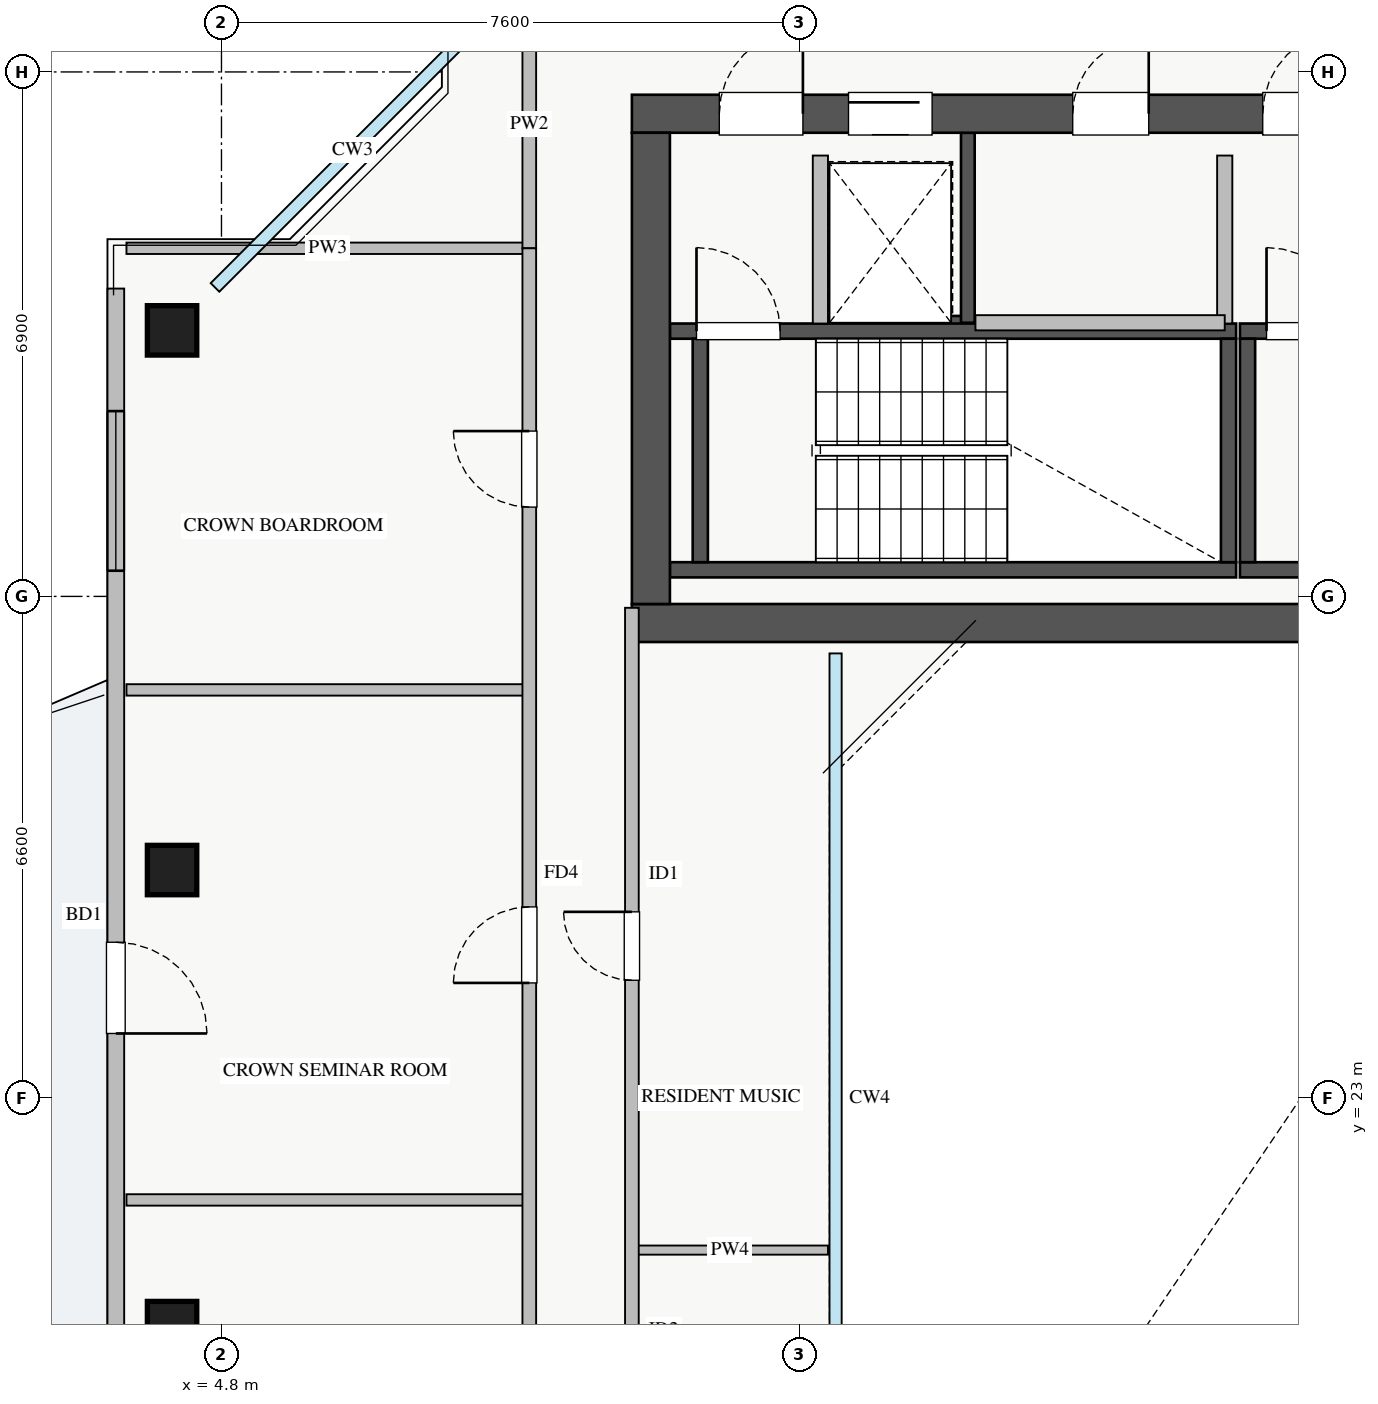
"""IFC4 building model, lengths in metres.
Left out: names, types, materials, properties, quantities, classifications, styles, units other than length and angle.
Written with IfcOpenShell. Run it as: python <this file> out.ifc"""

import sys

from ifc_helpers import new_model, si_unit, direction, frame, frame_2d, origin, origin_2d, place, context, subcontext, project, spatial, rectangle, extrude, source, transform, mapped, element, fill, save


model = new_model("IFC4")
c1 = context("Model", 3, precision=1e-05, world=origin(), true_north=direction((0.0, 1.0)))
c2 = subcontext(c1, "Body", "Model", "MODEL_VIEW")
j1 = project(units=[si_unit("LENGTHUNIT", "METRE"), si_unit("PLANEANGLEUNIT", "RADIAN")], contexts=[c1])
p1 = place(None, origin())
s1 = spatial("IfcSite", under=j1, at=p1, CompositionType="ELEMENT")
p2 = place(p1, origin())
s2 = spatial("IfcBuilding", under=s1, at=p2, CompositionType="ELEMENT")
p3 = place(p2, frame((0.0, 0.0, 243.75)))
s3 = spatial("IfcBuildingStorey", under=s2, at=p3, CompositionType="ELEMENT", Elevation=243.75)
p4 = place(p3, frame((12.68, 33.2, 0.0), z_axis=(0.0, 0.0, 1.0), x_axis=(1.0, 0.0, 0.0)))
e1 = element("IfcWall", 1, at=p4, inside=s3, PredefinedType="SHEAR", context=c2, shape_type="SweptSolid", body=[
    extrude(rectangle(XDim=1.94, YDim=0.18, at=frame_2d((0.97, 0.0))), origin(), (0.0, 0.0, 1.0), 3.07),
])
p5 = place(p3, frame((14.62, 33.2, 0.0), z_axis=(0.0, 0.0, 1.0), x_axis=(0.0, 1.0, 0.0)))
e2 = element("IfcWall", 2, at=p5, inside=s3, PredefinedType="SHEAR", context=c2, shape_type="SweptSolid", body=[
    extrude(rectangle(XDim=2.5, YDim=0.18, at=frame_2d((1.25, 0.0))), origin(), (0.0, 0.0, 1.0), 3.07),
])
p6 = place(p3, frame((10.7, 29.95, 0.0), z_axis=(0.0, 0.0, 1.0), x_axis=(1.0, 0.0, 0.0)))
e3 = element("IfcWall", 3, at=p6, inside=s3, PredefinedType="SHEAR", context=c2, shape_type="SweptSolid", body=[
    extrude(rectangle(XDim=7.45, YDim=0.2, at=frame_2d((3.725, 0.0))), origin(), (0.0, 0.0, 1.0), 3.25),
])
p7 = place(p3, frame((10.7, 33.09, 0.0), z_axis=(0.0, 0.0, 1.0), x_axis=(1.0, 0.0, 0.0)))
e4 = element("IfcWall", 4, at=p7, inside=s3, PredefinedType="SHEAR", context=c2, shape_type="SweptSolid", body=[
    extrude(rectangle(XDim=7.45, YDim=0.2, at=frame_2d((3.725, 0.0))), origin(), (0.0, 0.0, 1.0), 3.25),
])
p8 = place(p7, frame((0.35, 0.0, 0.0)))
e5 = element("IfcOpeningElement", 5, at=p8, cuts=e4, PredefinedType="OPENING", context=c2, shape_type="SweptSolid", body=[
    extrude(rectangle(XDim=1.1, YDim=2.05, at=frame_2d((0.55, 1.025))), frame((0.0, 0.11, 0.0), z_axis=(0.0, -1.0, 0.0), x_axis=(1.0, 0.0, 0.0)), (0.0, 0.0, 1.0), 0.22),
])
for number, where, z_axis, x_axis in (
    (6, (11.1, 30.05, 0.0), (0.0, 0.0, 1.0), (0.0, 1.0, 0.0)),
    (7, (18.05, 30.05, 0.0), (0.0, 0.0, 1.0), (0.0, 1.0, 0.0)),
):
    element("IfcWall", number, at=place(p3, frame(where, z_axis=z_axis, x_axis=x_axis)), inside=s3, PredefinedType="SHEAR", context=c2, shape_type="SweptSolid", body=[
        extrude(rectangle(XDim=2.94, YDim=0.2, at=frame_2d((1.47, 0.0))), origin(), (0.0, 0.0, 1.0), 3.25),
    ])
p9 = place(p3, frame((18.2, 29.95, 0.0), z_axis=(0.0, 0.0, 1.0), x_axis=(1.0, 0.0, 0.0)))
e8 = element("IfcWall", 8, at=p9, inside=s3, PredefinedType="SHEAR", context=c2, shape_type="SweptSolid", body=[
    extrude(rectangle(XDim=7.15, YDim=0.2, at=frame_2d((3.575, 0.0))), origin(), (0.0, 0.0, 1.0), 3.25),
])
p10 = place(p3, frame((18.2, 33.09, 0.0), z_axis=(0.0, 0.0, 1.0), x_axis=(1.0, 0.0, 0.0)))
e9 = element("IfcWall", 9, at=p10, inside=s3, PredefinedType="SHEAR", context=c2, shape_type="SweptSolid", body=[
    extrude(rectangle(XDim=7.15, YDim=0.2, at=frame_2d((3.575, 0.0))), origin(), (0.0, 0.0, 1.0), 3.25),
])
p11 = place(p10, frame((0.35, 0.0, 0.0)))
e10 = element("IfcOpeningElement", 10, at=p11, cuts=e9, PredefinedType="OPENING", context=c2, shape_type="SweptSolid", body=[
    extrude(rectangle(XDim=1.1, YDim=2.05, at=frame_2d((0.55, 1.025))), frame((0.0, 0.11, 0.0), z_axis=(0.0, -1.0, 0.0), x_axis=(1.0, 0.0, 0.0)), (0.0, 0.0, 1.0), 0.22),
])
p12 = place(p3, frame((18.3, 30.05, 0.0), z_axis=(0.0, 0.0, 1.0), x_axis=(0.0, 1.0, 0.0)))
e11 = element("IfcWall", 11, at=p12, inside=s3, PredefinedType="SHEAR", context=c2, shape_type="SweptSolid", body=[
    extrude(rectangle(XDim=2.94, YDim=0.2, at=frame_2d((1.47, 0.0))), origin(), (0.0, 0.0, 1.0), 3.25),
])
p13 = place(p3, frame((10.2, 29.25, 0.0), z_axis=(0.0, 0.0, 1.0), x_axis=(1.0, 0.0, 0.0)))
e12 = element("IfcWall", 12, at=p13, inside=s3, PredefinedType="SHEAR", context=c2, shape_type="SweptSolid", body=[
    extrude(rectangle(XDim=17.6, YDim=0.5, at=frame_2d((8.8, 0.0))), origin(), (0.0, 0.0, 1.0), 3.25),
])
p14 = place(p3, frame((10.2, 35.95, 0.0), z_axis=(0.0, 0.0, 1.0), x_axis=(1.0, 0.0, 0.0)))
e13 = element("IfcWall", 13, at=p14, inside=s3, PredefinedType="SHEAR", context=c2, shape_type="SweptSolid", body=[
    extrude(rectangle(XDim=17.6, YDim=0.5, at=frame_2d((8.8, 0.0))), origin(), (0.0, 0.0, 1.0), 3.25),
])
p15 = place(p14, frame((1.15, 0.0, 0.0)))
e14 = element("IfcOpeningElement", 14, at=p15, cuts=e13, PredefinedType="OPENING", context=c2, shape_type="SweptSolid", body=[
    extrude(rectangle(XDim=1.1, YDim=2.05, at=frame_2d((0.55, 1.025))), frame((0.0, 0.26, 0.0), z_axis=(0.0, -1.0, 0.0), x_axis=(1.0, 0.0, 0.0)), (0.0, 0.0, 1.0), 0.52),
])
p16 = place(p14, frame((8.3, 0.0, 0.0)))
e15 = element("IfcOpeningElement", 15, at=p16, cuts=e13, PredefinedType="OPENING", context=c2, shape_type="SweptSolid", body=[
    extrude(rectangle(XDim=1.1, YDim=2.05, at=frame_2d((0.55, 1.025))), frame((0.0, 0.26, 0.0), z_axis=(0.0, -1.0, 0.0), x_axis=(1.0, 0.0, 0.0)), (0.0, 0.0, 1.0), 0.52),
])
p17 = place(p14, frame((2.85, 0.0, 0.0)))
e16 = element("IfcOpeningElement", 16, at=p17, cuts=e13, PredefinedType="OPENING", context=c2, shape_type="SweptSolid", body=[
    extrude(rectangle(XDim=1.1, YDim=2.05, at=frame_2d((0.55, 1.025))), frame((0.0, 0.26, 0.0), z_axis=(0.0, -1.0, 0.0), x_axis=(1.0, 0.0, 0.0)), (0.0, 0.0, 1.0), 0.52),
])
p18 = place(p14, frame((5.8, 0.0, 0.0)))
e17 = element("IfcOpeningElement", 17, at=p18, cuts=e13, PredefinedType="OPENING", context=c2, shape_type="SweptSolid", body=[
    extrude(rectangle(XDim=1.0, YDim=2.05, at=frame_2d((0.5, 1.025))), frame((0.0, 0.26, 0.0), z_axis=(0.0, -1.0, 0.0), x_axis=(1.0, 0.0, 0.0)), (0.0, 0.0, 1.0), 0.52),
])
p19 = place(p14, frame((14.74, 0.0, 0.0)))
e18 = element("IfcOpeningElement", 18, at=p19, cuts=e13, PredefinedType="OPENING", context=c2, shape_type="SweptSolid", body=[
    extrude(rectangle(XDim=1.0, YDim=2.05, at=frame_2d((0.5, 1.025))), frame((0.0, 0.26, 0.0), z_axis=(0.0, -1.0, 0.0), x_axis=(1.0, 0.0, 0.0)), (0.0, 0.0, 1.0), 0.52),
])
p20 = place(p14, frame((10.005, 0.0, 0.0)))
e19 = element("IfcOpeningElement", 19, at=p20, cuts=e13, PredefinedType="OPENING", context=c2, shape_type="SweptSolid", body=[
    extrude(rectangle(XDim=1.0, YDim=2.05, at=frame_2d((0.5, 1.025))), frame((0.0, 0.26, 0.0), z_axis=(0.0, -1.0, 0.0), x_axis=(1.0, 0.0, 0.0)), (0.0, 0.0, 1.0), 0.52),
])
p21 = place(p14, frame((11.55, 0.0, 0.0)))
e20 = element("IfcOpeningElement", 20, at=p21, cuts=e13, PredefinedType="OPENING", context=c2, shape_type="SweptSolid", body=[
    extrude(rectangle(XDim=1.0, YDim=2.05, at=frame_2d((0.5, 1.025))), frame((0.0, 0.26, 0.0), z_axis=(0.0, -1.0, 0.0), x_axis=(1.0, 0.0, 0.0)), (0.0, 0.0, 1.0), 0.52),
])
p22 = place(p14, frame((13.215, 0.0, 0.0)))
e21 = element("IfcOpeningElement", 21, at=p22, cuts=e13, PredefinedType="OPENING", context=c2, shape_type="SweptSolid", body=[
    extrude(rectangle(XDim=1.0, YDim=2.05, at=frame_2d((0.5, 1.025))), frame((0.0, 0.26, 0.0), z_axis=(0.0, -1.0, 0.0), x_axis=(1.0, 0.0, 0.0)), (0.0, 0.0, 1.0), 0.52),
])
p23 = place(p3, frame((10.45, 29.5, 0.0), z_axis=(0.0, 0.0, 1.0), x_axis=(0.0, 1.0, 0.0)))
e22 = element("IfcWall", 22, at=p23, inside=s3, PredefinedType="SHEAR", context=c2, shape_type="SweptSolid", body=[
    extrude(rectangle(XDim=6.2, YDim=0.5, at=frame_2d((3.1, 0.0))), origin(), (0.0, 0.0, 1.0), 3.25),
])
m1 = source(origin(), c2, "Body", "SweptSolid", [
    extrude(rectangle(XDim=0.65, YDim=0.65, at=origin_2d()), origin(), (0.0, 0.0, 1.0), 3.25),
])
for number, where, z_axis, x_axis in (
    (23, (4.15, 33.1, 0.0), (0.0, 0.0, 1.0), (1.0, 0.0, 0.0)),
    (24, (4.15, 26.0, 0.0), (0.0, 0.0, 1.0), (1.0, 0.0, 0.0)),
    (25, (4.15, 20.0, 0.0), (0.0, 0.0, 1.0), (1.0, 0.0, 0.0)),
):
    element("IfcColumn", number, at=place(p3, frame(where, z_axis=z_axis, x_axis=x_axis)), inside=s3, PredefinedType="COLUMN", context=c2, shape_type="MappedRepresentation", body=[
        mapped(m1, transform((0.0, 0.0, 0.0), x_axis=(1.0, 0.0, 0.0), y_axis=(0.0, 1.0, 0.0), z_axis=(0.0, 0.0, 1.0), scale=1.0)),
    ])
p24 = place(p3, frame((3.41, 12.35, 0.0), z_axis=(0.0, 0.0, 1.0), x_axis=(0.0, 1.0, 0.0)))
e26 = element("IfcWall", 26, at=p24, inside=s3, PredefinedType="STANDARD", context=c2, shape_type="SweptSolid", body=[
    extrude(rectangle(XDim=21.3, YDim=0.22, at=frame_2d((10.65, 0.0))), origin(), (0.0, 0.0, 1.0), 2.61),
])
p25 = place(p24, frame((11.5, 0.0, 0.0)))
e27 = element("IfcOpeningElement", 27, at=p25, cuts=e26, PredefinedType="OPENING", context=c2, shape_type="SweptSolid", body=[
    extrude(rectangle(XDim=1.2, YDim=2.1, at=frame_2d((0.6, 1.05))), frame((0.0, 0.12, 0.0), z_axis=(0.0, -1.0, 0.0), x_axis=(1.0, 0.0, 0.0)), (0.0, 0.0, 1.0), 0.24),
])
p26 = place(p24, frame((1.463, 0.0, 0.9)))
e28 = element("IfcOpeningElement", 28, at=p26, cuts=e26, PredefinedType="OPENING", context=c2, shape_type="SweptSolid", body=[
    extrude(rectangle(XDim=2.4, YDim=1.48, at=frame_2d((1.2, 0.74))), frame((0.0, 0.12, 0.0), z_axis=(0.0, -1.0, 0.0), x_axis=(1.0, 0.0, 0.0)), (0.0, 0.0, 1.0), 0.24),
])
p27 = place(p24, frame((17.588, 0.0, 0.9)))
e29 = element("IfcOpeningElement", 29, at=p27, cuts=e26, PredefinedType="OPENING", context=c2, shape_type="SweptSolid", body=[
    extrude(rectangle(XDim=2.1, YDim=1.48, at=frame_2d((1.05, 0.74))), frame((0.0, 0.12, 0.0), z_axis=(0.0, -1.0, 0.0), x_axis=(1.0, 0.0, 0.0)), (0.0, 0.0, 1.0), 0.24),
])
for number, where, z_axis, x_axis in (
    (30, (12.68, 33.19, 0.0), (0.0, 0.0, 1.0), (0.0, 1.0, 0.0)),
    (31, (18.0, 33.19, 0.0), (0.0, 0.0, 1.0), (0.0, 1.0, 0.0)),
):
    element("IfcWall", number, at=place(p3, frame(where, z_axis=z_axis, x_axis=x_axis)), inside=s3, PredefinedType="PARTITIONING", context=c2, shape_type="SweptSolid", body=[
        extrude(rectangle(XDim=2.21, YDim=0.2, at=frame_2d((1.105, 0.0))), origin(), (0.0, 0.0, 1.0), 3.07),
    ])
p28 = place(p3, frame((14.72, 33.2, 0.0), z_axis=(0.0, 0.0, 1.0), x_axis=(1.0, 0.0, 0.0)))
e32 = element("IfcWall", 32, at=p28, inside=s3, PredefinedType="PARTITIONING", context=c2, shape_type="SweptSolid", body=[
    extrude(rectangle(XDim=3.28, YDim=0.2, at=frame_2d((1.64, 0.0))), origin(), (0.0, 0.0, 1.0), 3.07),
])
p29 = place(p3, frame((3.55, 34.18, 0.0), z_axis=(0.0, 0.0, 1.0), x_axis=(1.0, 0.0, 0.0)))
e33 = element("IfcWall", 33, at=p29, inside=s3, PredefinedType="PARTITIONING", context=c2, shape_type="SweptSolid", body=[
    extrude(rectangle(XDim=5.3, YDim=0.15, at=frame_2d((2.65, 0.0))), origin(), (0.0, 0.0, 1.0), 3.07),
])
p30 = place(p3, frame((8.85, 34.18, 0.0), z_axis=(0.0, 0.0, 1.0), x_axis=(0.0, 1.0, 0.0)))
e34 = element("IfcWall", 34, at=p30, inside=s3, PredefinedType="PARTITIONING", context=c2, shape_type="SweptSolid", body=[
    extrude(rectangle(XDim=3.26, YDim=0.18, at=frame_2d((1.63, 0.0))), origin(), (0.0, 0.0, 1.0), 2.569),
])
p31 = place(p3, frame((3.55, 21.66, 0.0), z_axis=(0.0, 0.0, 1.0), x_axis=(1.0, 0.0, 0.0)))
e35 = element("IfcWall", 35, at=p31, inside=s3, PredefinedType="PARTITIONING", context=c2, shape_type="SweptSolid", body=[
    extrude(rectangle(XDim=5.3, YDim=0.15, at=frame_2d((2.65, 0.0))), origin(), (0.0, 0.0, 1.0), 2.771),
])
p32 = place(p3, frame((3.55, 28.37, 0.0), z_axis=(0.0, 0.0, 1.0), x_axis=(1.0, 0.0, 0.0)))
e36 = element("IfcWall", 36, at=p32, inside=s3, PredefinedType="PARTITIONING", context=c2, shape_type="SweptSolid", body=[
    extrude(rectangle(XDim=5.3, YDim=0.15, at=frame_2d((2.65, 0.0))), origin(), (0.0, 0.0, 1.0), 3.07),
])
p33 = place(p3, frame((8.85, 11.82, 0.0), z_axis=(0.0, 0.0, 1.0), x_axis=(0.0, 1.0, 0.0)))
e37 = element("IfcWall", 37, at=p33, inside=s3, PredefinedType="PARTITIONING", context=c2, shape_type="SweptSolid", body=[
    extrude(rectangle(XDim=22.36, YDim=0.18, at=frame_2d((11.18, 0.0))), origin(), (0.0, 0.0, 1.0), 2.569),
])
p34 = place(p33, frame((4.42, 0.0, 0.0)))
e38 = element("IfcOpeningElement", 38, at=p34, cuts=e37, PredefinedType="OPENING", context=c2, shape_type="SweptSolid", body=[
    extrude(rectangle(XDim=1.0, YDim=2.05, at=frame_2d((0.5, 1.025))), frame((0.0, 0.1, 0.0), z_axis=(0.0, -1.0, 0.0), x_axis=(1.0, 0.0, 0.0)), (0.0, 0.0, 1.0), 0.2),
])
p35 = place(p33, frame((12.695, 0.0, 0.0)))
e39 = element("IfcOpeningElement", 39, at=p35, cuts=e37, PredefinedType="OPENING", context=c2, shape_type="SweptSolid", body=[
    extrude(rectangle(XDim=1.0, YDim=2.05, at=frame_2d((0.5, 1.025))), frame((0.0, 0.1, 0.0), z_axis=(0.0, -1.0, 0.0), x_axis=(1.0, 0.0, 0.0)), (0.0, 0.0, 1.0), 0.2),
])
p36 = place(p33, frame((18.955, 0.0, 0.0)))
e40 = element("IfcOpeningElement", 40, at=p36, cuts=e37, PredefinedType="OPENING", context=c2, shape_type="SweptSolid", body=[
    extrude(rectangle(XDim=1.0, YDim=2.05, at=frame_2d((0.5, 1.025))), frame((0.0, 0.1, 0.0), z_axis=(0.0, -1.0, 0.0), x_axis=(1.0, 0.0, 0.0)), (0.0, 0.0, 1.0), 0.2),
])
p37 = place(p3, frame((10.2, 21.0, 0.0), z_axis=(0.0, 0.0, 1.0), x_axis=(1.0, 0.0, 0.0)))
e41 = element("IfcWall", 41, at=p37, inside=s3, PredefinedType="PLUMBINGWALL", context=c2, shape_type="SweptSolid", body=[
    extrude(rectangle(XDim=2.58, YDim=0.12, at=frame_2d((1.29, 0.0))), origin(), (0.0, 0.0, 1.0), 3.07),
])
p38 = place(p3, frame((10.2, 16.55, 0.0), z_axis=(0.0, 0.0, 1.0), x_axis=(0.0, 1.0, 0.0)))
e42 = element("IfcWall", 42, at=p38, inside=s3, PredefinedType="PARTITIONING", context=c2, shape_type="SweptSolid", body=[
    extrude(rectangle(XDim=12.9, YDim=0.18, at=frame_2d((6.45, 0.0))), origin(), (0.0, 0.0, 1.0), 3.07),
])
p39 = place(p38, frame((2.025, 0.0, 0.0)))
e43 = element("IfcOpeningElement", 43, at=p39, cuts=e42, PredefinedType="OPENING", context=c2, shape_type="SweptSolid", body=[
    extrude(rectangle(XDim=0.85, YDim=2.05, at=frame_2d((0.425, 1.025))), frame((0.0, 0.1, 0.0), z_axis=(0.0, -1.0, 0.0), x_axis=(1.0, 0.0, 0.0)), (0.0, 0.0, 1.0), 0.2),
])
p40 = place(p38, frame((8.0, 0.0, 0.0)))
e44 = element("IfcOpeningElement", 44, at=p40, cuts=e42, PredefinedType="OPENING", context=c2, shape_type="SweptSolid", body=[
    extrude(rectangle(XDim=0.9, YDim=2.05, at=frame_2d((0.45, 1.025))), frame((0.0, 0.1, 0.0), z_axis=(0.0, -1.0, 0.0), x_axis=(1.0, 0.0, 0.0)), (0.0, 0.0, 1.0), 0.2),
])
m2 = source(origin(), c2, "Body", "SweptSolid", [
    extrude(rectangle(XDim=1.2, YDim=2.1, at=frame_2d((0.6, 1.05))), frame((0.0, 0.025, 0.0), z_axis=(0.0, -1.0, 0.0), x_axis=(1.0, 0.0, 0.0)), (0.0, 0.0, 1.0), 0.05),
])
p41 = place(p25, frame((1.2, 0.0, 0.0), z_axis=(0.0, 0.0, 1.0), x_axis=(-1.0, 0.0, 0.0)))
e45 = element("IfcDoor", 45, at=p41, inside=s3, OperationType="SINGLE_SWING_LEFT", PredefinedType="DOOR", context=c2, shape_type="MappedRepresentation", body=[
    mapped(m2, transform((0.0, 0.0, 0.0), x_axis=(1.0, 0.0, 0.0), y_axis=(0.0, 1.0, 0.0), z_axis=(0.0, 0.0, 1.0), scale=1.0)),
])
fill(e27, e45)
m3 = source(origin(), c2, "Body", "SweptSolid", [
    extrude(rectangle(XDim=2.1, YDim=1.48, at=frame_2d((1.05, 0.74))), frame((0.0, 0.03, 0.0), z_axis=(0.0, -1.0, 0.0), x_axis=(1.0, 0.0, 0.0)), (0.0, 0.0, 1.0), 0.06),
])
p42 = place(p27, origin())
e46 = element("IfcWindow", 46, at=p42, inside=s3, PartitioningType="TRIPLE_PANEL_VERTICAL", PredefinedType="WINDOW", context=c2, shape_type="MappedRepresentation", body=[
    mapped(m3, transform((0.0, 0.0, 0.0), x_axis=(1.0, 0.0, 0.0), y_axis=(0.0, 1.0, 0.0), z_axis=(0.0, 0.0, 1.0), scale=1.0)),
])
fill(e29, e46)
m4 = source(origin(), c2, "Body", "SweptSolid", [
    extrude(rectangle(XDim=1.1, YDim=2.05, at=frame_2d((0.55, 1.025))), frame((0.0, 0.025, 0.0), z_axis=(0.0, -1.0, 0.0), x_axis=(1.0, 0.0, 0.0)), (0.0, 0.0, 1.0), 0.05),
])
p43 = place(p15, origin())
e47 = element("IfcDoor", 47, at=p43, inside=s3, OperationType="SINGLE_SWING_RIGHT", PredefinedType="DOOR", context=c2, shape_type="MappedRepresentation", body=[
    mapped(m4, transform((0.0, 0.0, 0.0), x_axis=(1.0, 0.0, 0.0), y_axis=(0.0, 1.0, 0.0), z_axis=(0.0, 0.0, 1.0), scale=1.0)),
])
fill(e14, e47)
p44 = place(p8, origin())
e48 = element("IfcDoor", 48, at=p44, inside=s3, OperationType="SINGLE_SWING_LEFT", PredefinedType="DOOR", context=c2, shape_type="MappedRepresentation", body=[
    mapped(m4, transform((0.0, 0.0, 0.0), x_axis=(1.0, 0.0, 0.0), y_axis=(0.0, 1.0, 0.0), z_axis=(0.0, 0.0, 1.0), scale=1.0)),
])
fill(e5, e48)
p45 = place(p16, origin())
e49 = element("IfcDoor", 49, at=p45, inside=s3, OperationType="SINGLE_SWING_RIGHT", PredefinedType="DOOR", context=c2, shape_type="MappedRepresentation", body=[
    mapped(m4, transform((0.0, 0.0, 0.0), x_axis=(1.0, 0.0, 0.0), y_axis=(0.0, 1.0, 0.0), z_axis=(0.0, 0.0, 1.0), scale=1.0)),
])
fill(e15, e49)
p46 = place(p11, origin())
e50 = element("IfcDoor", 50, at=p46, inside=s3, OperationType="SINGLE_SWING_LEFT", PredefinedType="DOOR", context=c2, shape_type="MappedRepresentation", body=[
    mapped(m4, transform((0.0, 0.0, 0.0), x_axis=(1.0, 0.0, 0.0), y_axis=(0.0, 1.0, 0.0), z_axis=(0.0, 0.0, 1.0), scale=1.0)),
])
fill(e10, e50)
p47 = place(p17, origin())
e51 = element("IfcDoor", 51, at=p47, inside=s3, OperationType="SLIDING_TO_LEFT", PredefinedType="DOOR", context=c2, shape_type="MappedRepresentation", body=[
    mapped(m4, transform((0.0, 0.0, 0.0), x_axis=(1.0, 0.0, 0.0), y_axis=(0.0, 1.0, 0.0), z_axis=(0.0, 0.0, 1.0), scale=1.0)),
])
fill(e16, e51)
m5 = source(origin(), c2, "Body", "SweptSolid", [
    extrude(rectangle(XDim=1.0, YDim=2.05, at=frame_2d((0.5, 1.025))), frame((0.0, 0.025, 0.0), z_axis=(0.0, -1.0, 0.0), x_axis=(1.0, 0.0, 0.0)), (0.0, 0.0, 1.0), 0.05),
])
p48 = place(p18, origin())
e52 = element("IfcDoor", 52, at=p48, inside=s3, OperationType="SINGLE_SWING_RIGHT", PredefinedType="DOOR", context=c2, shape_type="MappedRepresentation", body=[
    mapped(m5, transform((0.0, 0.0, 0.0), x_axis=(1.0, 0.0, 0.0), y_axis=(0.0, 1.0, 0.0), z_axis=(0.0, 0.0, 1.0), scale=1.0)),
])
fill(e17, e52)
p49 = place(p35, origin())
e53 = element("IfcDoor", 53, at=p49, inside=s3, OperationType="SINGLE_SWING_LEFT", PredefinedType="DOOR", context=c2, shape_type="MappedRepresentation", body=[
    mapped(m5, transform((0.0, 0.0, 0.0), x_axis=(1.0, 0.0, 0.0), y_axis=(0.0, 1.0, 0.0), z_axis=(0.0, 0.0, 1.0), scale=1.0)),
])
fill(e39, e53)
p50 = place(p36, origin())
e54 = element("IfcDoor", 54, at=p50, inside=s3, OperationType="SINGLE_SWING_RIGHT", PredefinedType="DOOR", context=c2, shape_type="MappedRepresentation", body=[
    mapped(m5, transform((0.0, 0.0, 0.0), x_axis=(1.0, 0.0, 0.0), y_axis=(0.0, 1.0, 0.0), z_axis=(0.0, 0.0, 1.0), scale=1.0)),
])
fill(e40, e54)
m6 = source(origin(), c2, "Body", "SweptSolid", [
    extrude(rectangle(XDim=0.9, YDim=2.05, at=frame_2d((0.45, 1.025))), frame((0.0, 0.025, 0.0), z_axis=(0.0, -1.0, 0.0), x_axis=(1.0, 0.0, 0.0)), (0.0, 0.0, 1.0), 0.05),
])
p51 = place(p40, origin())
e55 = element("IfcDoor", 55, at=p51, inside=s3, OperationType="SINGLE_SWING_RIGHT", PredefinedType="DOOR", context=c2, shape_type="MappedRepresentation", body=[
    mapped(m6, transform((0.0, 0.0, 0.0), x_axis=(1.0, 0.0, 0.0), y_axis=(0.0, 1.0, 0.0), z_axis=(0.0, 0.0, 1.0), scale=1.0)),
])
fill(e44, e55)
save(model, sys.argv[1])
